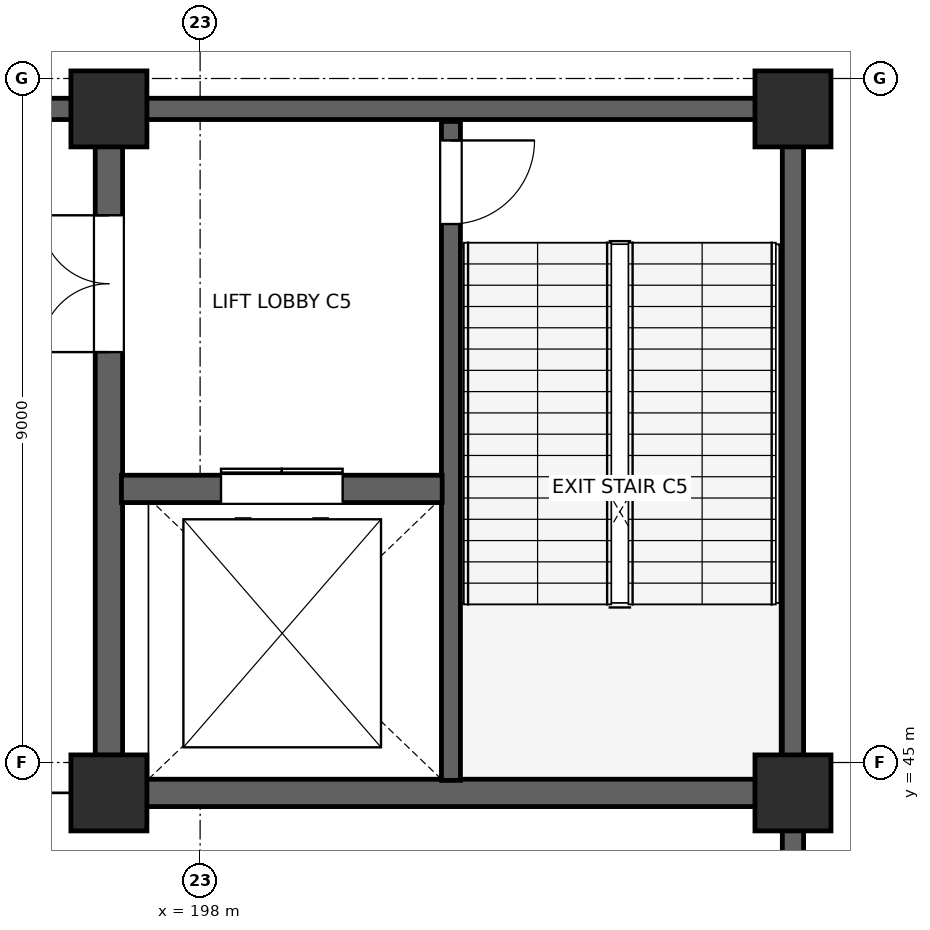
"""IFC4 building model, lengths in metres.
Left out: names, types, materials, properties, quantities, classifications, styles, units other than length and angle.
Written with IfcOpenShell. Run it as: python <this file> out.ifc"""

import sys

from ifc_helpers import new_model, si_unit, direction, frame, frame_2d, origin, origin_2d, place, context, subcontext, project, spatial, rectangle, extrude, element, fill, save


model = new_model("IFC4")
c1 = context("Model", 3, precision=1e-05, world=origin(), true_north=direction((0.0, 1.0)))
c2 = subcontext(c1, "Body", "Model", "MODEL_VIEW")
j1 = project(units=[si_unit("LENGTHUNIT", "METRE"), si_unit("PLANEANGLEUNIT", "RADIAN")], contexts=[c1])
p1 = place(None, origin())
s1 = spatial("IfcSite", under=j1, at=p1, CompositionType="ELEMENT")
p2 = place(p1, origin())
s2 = spatial("IfcBuilding", under=s1, at=p2, CompositionType="ELEMENT")
p3 = place(p2, frame((0.0, 0.0, 6.0)))
s3 = spatial("IfcBuildingStorey", under=s2, at=p3, CompositionType="ELEMENT", Elevation=6.0)
for number, where, z_axis, x_axis in (
    (1, (196.8, 44.6, 0.0), (0.0, 0.0, 1.0), (1.0, 0.0, 0.0)),
    (2, (196.8, 53.6, 0.0), (0.0, 0.0, 1.0), (1.0, 0.0, 0.0)),
    (3, (205.8, 44.6, 0.0), (0.0, 0.0, 1.0), (1.0, 0.0, 0.0)),
    (4, (205.8, 53.6, 0.0), (0.0, 0.0, 1.0), (1.0, 0.0, 0.0)),
):
    element("IfcColumn", number, at=place(p3, frame(where, z_axis=z_axis, x_axis=x_axis)), inside=s3, PredefinedType="COLUMN", context=c2, shape_type="SweptSolid", body=[
        extrude(rectangle(XDim=1.0, YDim=1.0, at=origin_2d()), origin(), (0.0, 0.0, 1.0), 6.0),
    ])
p4 = place(p3, frame((189.392, 53.6, 0.0), z_axis=(0.0, 0.0, 1.0), x_axis=(1.0, 0.0, 0.0)))
e5 = element("IfcWall", 5, at=p4, inside=s3, PredefinedType="STANDARD", context=c2, shape_type="SweptSolid", body=[
    extrude(rectangle(XDim=6.916, YDim=0.28, at=frame_2d((3.458, 0.0))), origin(), (0.0, 0.0, 1.0), 5.7),
])
p5 = place(p3, frame((197.292, 53.6, 0.0), z_axis=(0.0, 0.0, 1.0), x_axis=(1.0, 0.0, 0.0)))
e6 = element("IfcWall", 6, at=p5, inside=s3, PredefinedType="STANDARD", context=c2, shape_type="SweptSolid", body=[
    extrude(rectangle(XDim=8.016, YDim=0.28, at=frame_2d((4.008, 0.0))), origin(), (0.0, 0.0, 1.0), 5.7),
])
p6 = place(p3, frame((205.8, 44.108, 0.0), z_axis=(0.0, 0.0, 1.0), x_axis=(0.0, -1.0, 0.0)))
e7 = element("IfcWall", 7, at=p6, inside=s3, PredefinedType="STANDARD", context=c2, shape_type="SweptSolid", body=[
    extrude(rectangle(XDim=7.616, YDim=0.28, at=frame_2d((3.808, 0.0))), origin(), (0.0, 0.0, 1.0), 5.7),
])
p7 = place(p3, frame((205.8, 53.108, 0.0), z_axis=(0.0, 0.0, 1.0), x_axis=(0.0, -1.0, 0.0)))
e8 = element("IfcWall", 8, at=p7, inside=s3, PredefinedType="STANDARD", context=c2, shape_type="SweptSolid", body=[
    extrude(rectangle(XDim=8.016, YDim=0.28, at=frame_2d((4.008, 0.0))), origin(), (0.0, 0.0, 1.0), 5.7),
])
p8 = place(p3, frame((196.8, 45.095, 0.0), z_axis=(0.0, 0.0, 1.0), x_axis=(0.0, 1.0, 0.0)))
e9 = element("IfcWall", 9, at=p8, inside=s3, PredefinedType="SHEAR", context=c2, shape_type="SweptSolid", body=[
    extrude(rectangle(XDim=8.01, YDim=0.36, at=frame_2d((4.005, 0.0))), origin(), (0.0, 0.0, 1.0), 5.7),
])
p9 = place(p8, frame((5.305, 0.0, 0.0)))
e10 = element("IfcOpeningElement", 10, at=p9, cuts=e9, PredefinedType="OPENING", context=c2, shape_type="SweptSolid", body=[
    extrude(rectangle(XDim=1.8, YDim=2.3, at=frame_2d((0.9, 1.15))), frame((0.0, 0.19, 0.0), z_axis=(0.0, -1.0, 0.0), x_axis=(1.0, 0.0, 0.0)), (0.0, 0.0, 1.0), 0.38),
])
p10 = place(p3, frame((197.295, 44.6, 0.0), z_axis=(0.0, 0.0, 1.0), x_axis=(1.0, 0.0, 0.0)))
e11 = element("IfcWall", 11, at=p10, inside=s3, PredefinedType="SHEAR", context=c2, shape_type="SweptSolid", body=[
    extrude(rectangle(XDim=8.01, YDim=0.36, at=frame_2d((4.005, 0.0))), origin(), (0.0, 0.0, 1.0), 5.7),
])
p11 = place(p3, frame((201.3, 53.435, 0.0), z_axis=(0.0, 0.0, 1.0), x_axis=(0.0, -1.0, 0.0)))
e12 = element("IfcWall", 12, at=p11, inside=s3, PredefinedType="SHEAR", context=c2, shape_type="SweptSolid", body=[
    extrude(rectangle(XDim=8.67, YDim=0.25, at=frame_2d((4.335, 0.0))), origin(), (0.0, 0.0, 1.0), 5.7),
])
p12 = place(p11, frame((0.25, 0.0, 0.0)))
e13 = element("IfcOpeningElement", 13, at=p12, cuts=e12, PredefinedType="OPENING", context=c2, shape_type="SweptSolid", body=[
    extrude(rectangle(XDim=1.1, YDim=2.2, at=frame_2d((0.55, 1.1))), frame((0.0, 0.135, 0.0), z_axis=(0.0, -1.0, 0.0), x_axis=(1.0, 0.0, 0.0)), (0.0, 0.0, 1.0), 0.27),
])
p13 = place(p3, frame((196.965, 48.6, 0.0), z_axis=(0.0, 0.0, 1.0), x_axis=(1.0, 0.0, 0.0)))
e14 = element("IfcWall", 14, at=p13, inside=s3, PredefinedType="SHEAR", context=c2, shape_type="SweptSolid", body=[
    extrude(rectangle(XDim=4.22, YDim=0.36, at=frame_2d((2.11, 0.0))), origin(), (0.0, 0.0, 1.0), 5.7),
])
p14 = place(p13, frame((1.31, 0.0, 0.0)))
e15 = element("IfcOpeningElement", 15, at=p14, cuts=e14, PredefinedType="OPENING", context=c2, shape_type="SweptSolid", body=[
    extrude(rectangle(XDim=1.6, YDim=2.4, at=frame_2d((0.8, 1.2))), frame((0.0, 0.19, 0.0), z_axis=(0.0, -1.0, 0.0), x_axis=(1.0, 0.0, 0.0)), (0.0, 0.0, 1.0), 0.38),
])
p15 = place(p12, origin())
e16 = element("IfcDoor", 16, at=p15, inside=s3, OperationType="SINGLE_SWING_LEFT", PredefinedType="DOOR", context=c2, shape_type="SweptSolid", body=[
    extrude(rectangle(XDim=1.1, YDim=2.2, at=frame_2d((0.55, 1.1))), frame((0.0, 0.025, 0.0), z_axis=(0.0, -1.0, 0.0), x_axis=(1.0, 0.0, 0.0)), (0.0, 0.0, 1.0), 0.05),
])
fill(e13, e16)
p16 = place(p14, origin())
e17 = element("IfcDoor", 17, at=p16, inside=s3, OperationType="DOUBLE_DOOR_SLIDING", PredefinedType="DOOR", context=c2, shape_type="SweptSolid", body=[
    extrude(rectangle(XDim=1.6, YDim=2.4, at=frame_2d((0.8, 1.2))), frame((0.0, 0.025, 0.0), z_axis=(0.0, -1.0, 0.0), x_axis=(1.0, 0.0, 0.0)), (0.0, 0.0, 1.0), 0.05),
])
fill(e15, e17)
p17 = place(p9, origin())
e18 = element("IfcDoor", 18, at=p17, inside=s3, OperationType="DOUBLE_DOOR_SINGLE_SWING", PredefinedType="DOOR", context=c2, shape_type="SweptSolid", body=[
    extrude(rectangle(XDim=1.8, YDim=2.3, at=frame_2d((0.9, 1.15))), frame((0.0, 0.025, 0.0), z_axis=(0.0, -1.0, 0.0), x_axis=(1.0, 0.0, 0.0)), (0.0, 0.0, 1.0), 0.05),
])
fill(e10, e18)
save(model, sys.argv[1])
